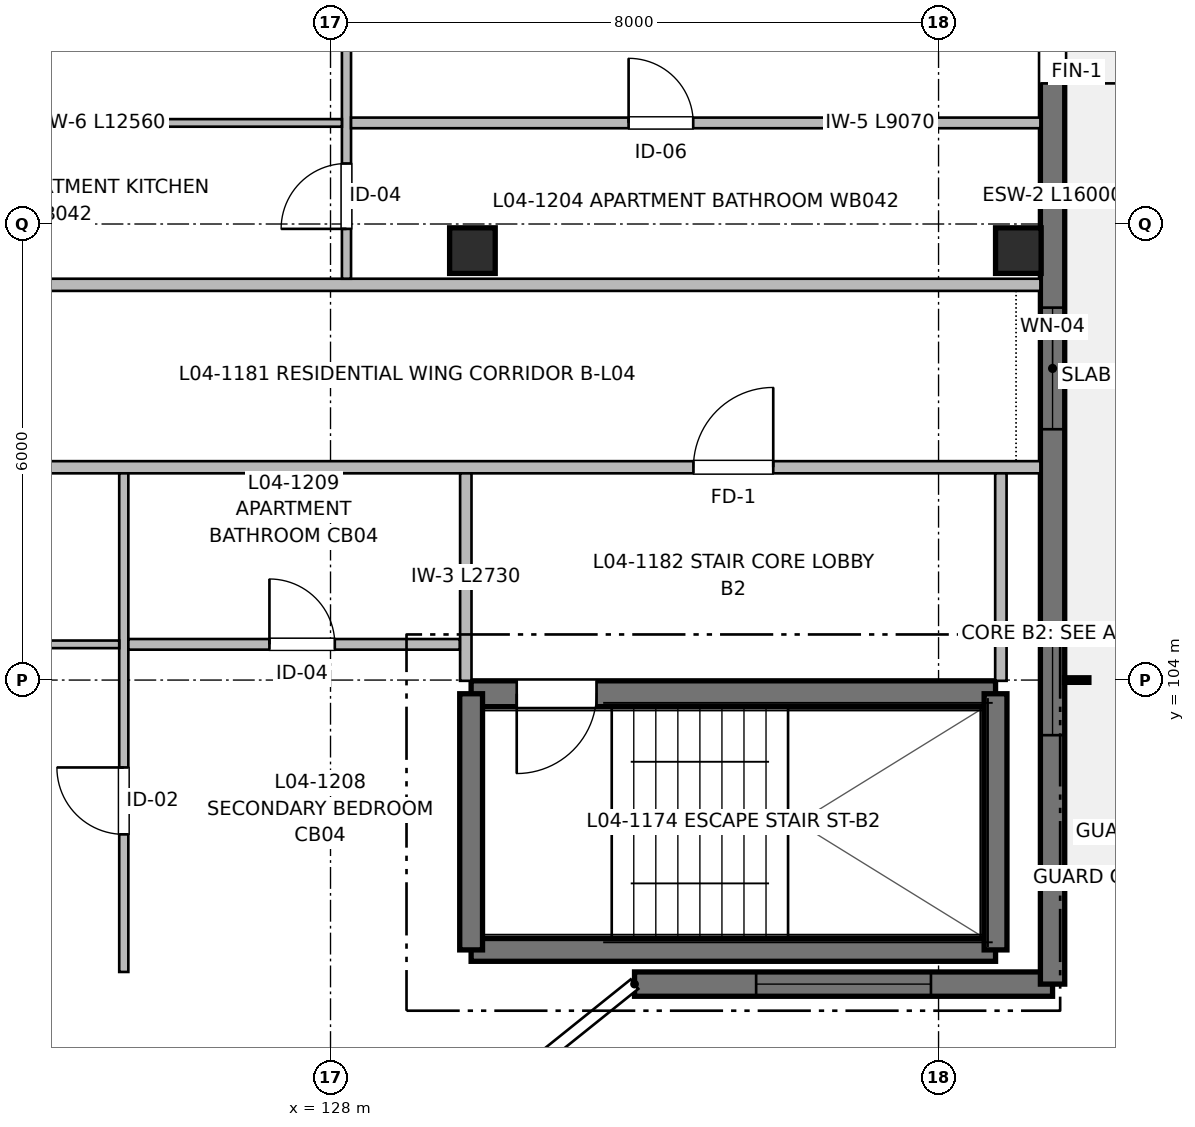
"""IFC4 building model, lengths in metres.
Left out: names, types, materials, properties, quantities, classifications, styles, units other than length and angle.
Written with IfcOpenShell. Run it as: python <this file> out.ifc"""

import sys

from ifc_helpers import new_model, si_unit, direction, frame, frame_2d, origin, origin_2d, place, context, subcontext, project, spatial, rectangle, extrude, element, fill, save


model = new_model("IFC4")
c1 = context("Model", 3, precision=1e-05, world=origin(), true_north=direction((0.0, 1.0)))
c2 = subcontext(c1, "Body", "Model", "MODEL_VIEW")
j1 = project(units=[si_unit("LENGTHUNIT", "METRE"), si_unit("PLANEANGLEUNIT", "RADIAN")], contexts=[c1])
p1 = place(None, origin())
s1 = spatial("IfcSite", under=j1, at=p1, CompositionType="ELEMENT")
p2 = place(p1, origin())
s2 = spatial("IfcBuilding", under=s1, at=p2, CompositionType="ELEMENT")
p3 = place(p2, frame((0.0, 0.0, 13.76)))
s3 = spatial("IfcBuildingStorey", under=s2, at=p3, CompositionType="ELEMENT", Elevation=13.76)
for number, where, z_axis, x_axis in (
    (1, (129.867, 109.65, 0.0), (0.0, 0.0, 1.0), (1.0, 0.0, 0.0)),
    (2, (137.05, 109.65, 0.0), (0.0, 0.0, 1.0), (1.0, 0.0, 0.0)),
):
    element("IfcColumn", number, at=place(p3, frame(where, z_axis=z_axis, x_axis=x_axis)), inside=s3, PredefinedType="COLUMN", context=c2, shape_type="SweptSolid", body=[
        extrude(rectangle(XDim=0.6, YDim=0.6, at=origin_2d()), origin(), (0.0, 0.0, 1.0), 3.2),
    ])
p4 = place(p3, frame((129.85, 100.45, 0.0), z_axis=(0.0, 0.0, 1.0), x_axis=(1.0, 0.0, 0.0)))
e3 = element("IfcWall", 3, at=p4, inside=s3, PredefinedType="SHEAR", context=c2, shape_type="SweptSolid", body=[
    extrude(rectangle(XDim=6.9, YDim=0.3, at=frame_2d((3.45, 0.0))), origin(), (0.0, 0.0, 1.0), 3.2),
])
p5 = place(p3, frame((136.75, 103.82, 0.0), z_axis=(0.0, 0.0, 1.0), x_axis=(-1.0, 0.0, 0.0)))
e4 = element("IfcWall", 4, at=p5, inside=s3, PredefinedType="SHEAR", context=c2, shape_type="SweptSolid", body=[
    extrude(rectangle(XDim=6.9, YDim=0.34, at=frame_2d((3.45, 0.0))), origin(), (0.0, 0.0, 1.0), 3.2),
])
p6 = place(p5, frame((5.25, 0.0, 0.0)))
e5 = element("IfcOpeningElement", 5, at=p6, cuts=e4, PredefinedType="OPENING", context=c2, shape_type="SweptSolid", body=[
    extrude(rectangle(XDim=1.05, YDim=2.15, at=frame_2d((0.525, 1.075))), frame((0.0, 0.18, 0.0), z_axis=(0.0, -1.0, 0.0), x_axis=(1.0, 0.0, 0.0)), (0.0, 0.0, 1.0), 0.36),
])
for number, where, z_axis, x_axis in (
    (6, (129.85, 103.82, 0.0), (0.0, 0.0, 1.0), (0.0, -1.0, 0.0)),
    (7, (136.75, 100.45, 0.0), (0.0, 0.0, 1.0), (0.0, 1.0, 0.0)),
):
    element("IfcWall", number, at=place(p3, frame(where, z_axis=z_axis, x_axis=x_axis)), inside=s3, PredefinedType="SHEAR", context=c2, shape_type="SweptSolid", body=[
        extrude(rectangle(XDim=3.37, YDim=0.3, at=frame_2d((1.685, 0.0))), origin(), (0.0, 0.0, 1.0), 3.2),
    ])
p7 = place(p3, frame((137.5, 100.0, 0.0), z_axis=(0.0, 0.0, 1.0), x_axis=(-1.0, 0.0, 0.0)))
e8 = element("IfcWall", 8, at=p7, inside=s3, PredefinedType="SHEAR", context=c2, shape_type="SweptSolid", body=[
    extrude(rectangle(XDim=5.5, YDim=0.32, at=frame_2d((2.75, 0.0))), origin(), (0.0, 0.0, 1.0), 2.98),
])
p8 = place(p7, frame((1.6, 0.0, 0.57)))
e9 = element("IfcOpeningElement", 9, at=p8, cuts=e8, PredefinedType="OPENING", context=c2, shape_type="SweptSolid", body=[
    extrude(rectangle(XDim=2.3, YDim=1.65, at=frame_2d((1.15, 0.825))), frame((0.0, 0.17, 0.0), z_axis=(0.0, -1.0, 0.0), x_axis=(1.0, 0.0, 0.0)), (0.0, 0.0, 1.0), 0.34),
])
p9 = place(p3, frame((137.5, 116.0, 0.0), z_axis=(0.0, 0.0, 1.0), x_axis=(0.0, -1.0, 0.0)))
e10 = element("IfcWall", 10, at=p9, inside=s3, PredefinedType="SHEAR", context=c2, shape_type="SweptSolid", body=[
    extrude(rectangle(XDim=16.0, YDim=0.32, at=frame_2d((8.0, 0.0))), origin(), (0.0, 0.0, 1.0), 2.98),
])
p10 = place(p9, frame((2.95, 0.0, 0.0)))
e11 = element("IfcOpeningElement", 11, at=p10, cuts=e10, PredefinedType="OPENING", context=c2, shape_type="SweptSolid", body=[
    extrude(rectangle(XDim=1.2, YDim=2.2, at=frame_2d((0.6, 1.1))), frame((0.0, 0.17, 0.0), z_axis=(0.0, -1.0, 0.0), x_axis=(1.0, 0.0, 0.0)), (0.0, 0.0, 1.0), 0.34),
])
p11 = place(p9, frame((7.1, 0.0, 0.77)))
e12 = element("IfcOpeningElement", 12, at=p11, cuts=e10, PredefinedType="OPENING", context=c2, shape_type="SweptSolid", body=[
    extrude(rectangle(XDim=1.6, YDim=1.45, at=frame_2d((0.8, 0.725))), frame((0.0, 0.17, 0.0), z_axis=(0.0, -1.0, 0.0), x_axis=(1.0, 0.0, 0.0)), (0.0, 0.0, 1.0), 0.34),
])
p12 = place(p9, frame((11.275, 0.0, 0.77)))
e13 = element("IfcOpeningElement", 13, at=p12, cuts=e10, PredefinedType="OPENING", context=c2, shape_type="SweptSolid", body=[
    extrude(rectangle(XDim=1.45, YDim=1.45, at=frame_2d((0.725, 0.725))), frame((0.0, 0.17, 0.0), z_axis=(0.0, -1.0, 0.0), x_axis=(1.0, 0.0, 0.0)), (0.0, 0.0, 1.0), 0.34),
])
p13 = place(p3, frame((113.2, 106.8, 0.0), z_axis=(0.0, 0.0, 1.0), x_axis=(1.0, 0.0, 0.0)))
e14 = element("IfcWall", 14, at=p13, inside=s3, PredefinedType="PARTITIONING", context=c2, shape_type="SweptSolid", body=[
    extrude(rectangle(XDim=24.14, YDim=0.16, at=frame_2d((12.07, 0.0))), origin(), (0.0, 0.0, 1.0), 2.935),
])
p14 = place(p13, frame((19.575, 0.0, 0.0)))
e15 = element("IfcOpeningElement", 15, at=p14, cuts=e14, PredefinedType="OPENING", context=c2, shape_type="SweptSolid", body=[
    extrude(rectangle(XDim=1.05, YDim=2.15, at=frame_2d((0.525, 1.075))), frame((0.0, 0.09, 0.0), z_axis=(0.0, -1.0, 0.0), x_axis=(1.0, 0.0, 0.0)), (0.0, 0.0, 1.0), 0.18),
])
p15 = place(p13, frame((8.995, 0.0, 0.0)))
e16 = element("IfcOpeningElement", 16, at=p15, cuts=e14, PredefinedType="OPENING", context=c2, shape_type="SweptSolid", body=[
    extrude(rectangle(XDim=0.98, YDim=2.15, at=frame_2d((0.49, 1.075))), frame((0.0, 0.09, 0.0), z_axis=(0.0, -1.0, 0.0), x_axis=(1.0, 0.0, 0.0)), (0.0, 0.0, 1.0), 0.18),
])
p16 = place(p3, frame((93.66, 109.2, 0.0), z_axis=(0.0, 0.0, 1.0), x_axis=(1.0, 0.0, 0.0)))
e17 = element("IfcWall", 17, at=p16, inside=s3, PredefinedType="PARTITIONING", context=c2, shape_type="SweptSolid", body=[
    extrude(rectangle(XDim=43.68, YDim=0.16, at=frame_2d((21.84, 0.0))), origin(), (0.0, 0.0, 1.0), 2.935),
])
p17 = place(p16, frame((5.815, 0.0, 0.0)))
e18 = element("IfcOpeningElement", 18, at=p17, cuts=e17, PredefinedType="OPENING", context=c2, shape_type="SweptSolid", body=[
    extrude(rectangle(XDim=0.98, YDim=2.15, at=frame_2d((0.49, 1.075))), frame((0.0, 0.09, 0.0), z_axis=(0.0, -1.0, 0.0), x_axis=(1.0, 0.0, 0.0)), (0.0, 0.0, 1.0), 0.18),
])
p18 = place(p16, frame((27.35, 0.0, 0.0)))
e19 = element("IfcOpeningElement", 19, at=p18, cuts=e17, PredefinedType="OPENING", context=c2, shape_type="SweptSolid", body=[
    extrude(rectangle(XDim=0.98, YDim=2.15, at=frame_2d((0.49, 1.075))), frame((0.0, 0.09, 0.0), z_axis=(0.0, -1.0, 0.0), x_axis=(1.0, 0.0, 0.0)), (0.0, 0.0, 1.0), 0.18),
])
for number, where, z_axis, x_axis in (
    (20, (129.78, 103.99, 0.0), (0.0, 0.0, 1.0), (0.0, 1.0, 0.0)),
    (21, (136.82, 103.99, 0.0), (0.0, 0.0, 1.0), (0.0, 1.0, 0.0)),
):
    element("IfcWall", number, at=place(p3, frame(where, z_axis=z_axis, x_axis=x_axis)), inside=s3, PredefinedType="PARTITIONING", context=c2, shape_type="SweptSolid", body=[
        extrude(rectangle(XDim=2.73, YDim=0.15, at=frame_2d((1.365, 0.0))), origin(), (0.0, 0.0, 1.0), 2.935),
    ])
p19 = place(p3, frame((128.21, 109.28, 0.0), z_axis=(0.0, 0.0, 1.0), x_axis=(0.0, 1.0, 0.0)))
e22 = element("IfcWall", 22, at=p19, inside=s3, PredefinedType="PARTITIONING", context=c2, shape_type="SweptSolid", body=[
    extrude(rectangle(XDim=6.59, YDim=0.12, at=frame_2d((3.295, 0.0))), origin(), (0.0, 0.0, 1.0), 2.935),
])
p20 = place(p19, frame((0.656, 0.0, 0.0)))
e23 = element("IfcOpeningElement", 23, at=p20, cuts=e22, PredefinedType="OPENING", context=c2, shape_type="SweptSolid", body=[
    extrude(rectangle(XDim=0.86, YDim=2.1, at=frame_2d((0.43, 1.05))), frame((0.0, 0.07, 0.0), z_axis=(0.0, -1.0, 0.0), x_axis=(1.0, 0.0, 0.0)), (0.0, 0.0, 1.0), 0.14),
])
p21 = place(p19, frame((4.093, 0.0, 0.0)))
e24 = element("IfcOpeningElement", 24, at=p21, cuts=e22, PredefinedType="OPENING", context=c2, shape_type="SweptSolid", body=[
    extrude(rectangle(XDim=0.9, YDim=2.1, at=frame_2d((0.45, 1.05))), frame((0.0, 0.07, 0.0), z_axis=(0.0, -1.0, 0.0), x_axis=(1.0, 0.0, 0.0)), (0.0, 0.0, 1.0), 0.14),
])
p22 = place(p3, frame((128.27, 111.33, 0.0), z_axis=(0.0, 0.0, 1.0), x_axis=(1.0, 0.0, 0.0)))
e25 = element("IfcWall", 25, at=p22, inside=s3, PredefinedType="PARTITIONING", context=c2, shape_type="SweptSolid", body=[
    extrude(rectangle(XDim=9.07, YDim=0.14, at=frame_2d((4.535, 0.0))), origin(), (0.0, 0.0, 1.0), 2.935),
])
p23 = place(p22, frame((3.652, 0.0, 0.0)))
e26 = element("IfcOpeningElement", 26, at=p23, cuts=e25, PredefinedType="OPENING", context=c2, shape_type="SweptSolid", body=[
    extrude(rectangle(XDim=0.85, YDim=2.05, at=frame_2d((0.425, 1.025))), frame((0.0, 0.08, 0.0), z_axis=(0.0, -1.0, 0.0), x_axis=(1.0, 0.0, 0.0)), (0.0, 0.0, 1.0), 0.16),
])
p24 = place(p3, frame((115.59, 111.33, 0.0), z_axis=(0.0, 0.0, 1.0), x_axis=(1.0, 0.0, 0.0)))
e27 = element("IfcWall", 27, at=p24, inside=s3, PredefinedType="PARTITIONING", context=c2, shape_type="SweptSolid", body=[
    extrude(rectangle(XDim=12.56, YDim=0.1, at=frame_2d((6.28, 0.0))), origin(), (0.0, 0.0, 1.0), 2.935),
])
p25 = place(p24, frame((5.048, 0.0, 0.0)))
e28 = element("IfcOpeningElement", 28, at=p25, cuts=e27, PredefinedType="OPENING", context=c2, shape_type="SweptSolid", body=[
    extrude(rectangle(XDim=0.92, YDim=2.1, at=frame_2d((0.46, 1.05))), frame((0.0, 0.06, 0.0), z_axis=(0.0, -1.0, 0.0), x_axis=(1.0, 0.0, 0.0)), (0.0, 0.0, 1.0), 0.12),
])
p26 = place(p3, frame((125.28, 100.16, 0.0), z_axis=(0.0, 0.0, 1.0), x_axis=(0.0, 1.0, 0.0)))
e29 = element("IfcWall", 29, at=p26, inside=s3, PredefinedType="PARTITIONING", context=c2, shape_type="SweptSolid", body=[
    extrude(rectangle(XDim=6.56, YDim=0.12, at=frame_2d((3.28, 0.0))), origin(), (0.0, 0.0, 1.0), 2.935),
])
p27 = place(p26, frame((1.81, 0.0, 0.0)))
e30 = element("IfcOpeningElement", 30, at=p27, cuts=e29, PredefinedType="OPENING", context=c2, shape_type="SweptSolid", body=[
    extrude(rectangle(XDim=0.88, YDim=2.1, at=frame_2d((0.44, 1.05))), frame((0.0, 0.07, 0.0), z_axis=(0.0, -1.0, 0.0), x_axis=(1.0, 0.0, 0.0)), (0.0, 0.0, 1.0), 0.14),
])
p28 = place(p3, frame((125.34, 104.47, 0.0), z_axis=(0.0, 0.0, 1.0), x_axis=(1.0, 0.0, 0.0)))
e31 = element("IfcWall", 31, at=p28, inside=s3, PredefinedType="PARTITIONING", context=c2, shape_type="SweptSolid", body=[
    extrude(rectangle(XDim=4.36, YDim=0.14, at=frame_2d((2.18, 0.0))), origin(), (0.0, 0.0, 1.0), 2.935),
])
p29 = place(p28, frame((1.856, 0.0, 0.0)))
e32 = element("IfcOpeningElement", 32, at=p29, cuts=e31, PredefinedType="OPENING", context=c2, shape_type="SweptSolid", body=[
    extrude(rectangle(XDim=0.86, YDim=2.1, at=frame_2d((0.43, 1.05))), frame((0.0, 0.08, 0.0), z_axis=(0.0, -1.0, 0.0), x_axis=(1.0, 0.0, 0.0)), (0.0, 0.0, 1.0), 0.16),
])
p30 = place(p3, frame((120.09, 104.47, 0.0), z_axis=(0.0, 0.0, 1.0), x_axis=(1.0, 0.0, 0.0)))
e33 = element("IfcWall", 33, at=p30, inside=s3, PredefinedType="PARTITIONING", context=c2, shape_type="SweptSolid", body=[
    extrude(rectangle(XDim=5.13, YDim=0.1, at=frame_2d((2.565, 0.0))), origin(), (0.0, 0.0, 1.0), 2.935),
])
p31 = place(p30, frame((2.18, 0.0, 0.0)))
e34 = element("IfcOpeningElement", 34, at=p31, cuts=e33, PredefinedType="OPENING", context=c2, shape_type="SweptSolid", body=[
    extrude(rectangle(XDim=0.92, YDim=2.1, at=frame_2d((0.46, 1.05))), frame((0.0, 0.06, 0.0), z_axis=(0.0, -1.0, 0.0), x_axis=(1.0, 0.0, 0.0)), (0.0, 0.0, 1.0), 0.12),
])
p32 = place(p6, origin())
e35 = element("IfcDoor", 35, at=p32, inside=s3, OperationType="SINGLE_SWING_RIGHT", PredefinedType="DOOR", context=c2, shape_type="SweptSolid", body=[
    extrude(rectangle(XDim=1.05, YDim=2.15, at=frame_2d((0.525, 1.075))), frame((0.0, 0.025, 0.0), z_axis=(0.0, -1.0, 0.0), x_axis=(1.0, 0.0, 0.0)), (0.0, 0.0, 1.0), 0.05),
])
fill(e5, e35)
p33 = place(p8, origin())
e36 = element("IfcWindow", 36, at=p33, inside=s3, PartitioningType="SINGLE_PANEL", PredefinedType="WINDOW", context=c2, shape_type="SweptSolid", body=[
    extrude(rectangle(XDim=2.3, YDim=1.65, at=frame_2d((1.15, 0.825))), frame((0.0, 0.03, 0.0), z_axis=(0.0, -1.0, 0.0), x_axis=(1.0, 0.0, 0.0)), (0.0, 0.0, 1.0), 0.06),
])
fill(e9, e36)
p34 = place(p10, origin())
e37 = element("IfcDoor", 37, at=p34, inside=s3, OperationType="SINGLE_SWING_RIGHT", PredefinedType="DOOR", context=c2, shape_type="SweptSolid", body=[
    extrude(rectangle(XDim=1.2, YDim=2.2, at=frame_2d((0.6, 1.1))), frame((0.0, 0.025, 0.0), z_axis=(0.0, -1.0, 0.0), x_axis=(1.0, 0.0, 0.0)), (0.0, 0.0, 1.0), 0.05),
])
fill(e11, e37)
p35 = place(p11, origin())
e38 = element("IfcWindow", 38, at=p35, inside=s3, PartitioningType="SINGLE_PANEL", PredefinedType="WINDOW", context=c2, shape_type="SweptSolid", body=[
    extrude(rectangle(XDim=1.6, YDim=1.45, at=frame_2d((0.8, 0.725))), frame((0.0, 0.03, 0.0), z_axis=(0.0, -1.0, 0.0), x_axis=(1.0, 0.0, 0.0)), (0.0, 0.0, 1.0), 0.06),
])
fill(e12, e38)
p36 = place(p12, origin())
e39 = element("IfcWindow", 39, at=p36, inside=s3, PartitioningType="SINGLE_PANEL", PredefinedType="WINDOW", context=c2, shape_type="SweptSolid", body=[
    extrude(rectangle(XDim=1.45, YDim=1.45, at=frame_2d((0.725, 0.725))), frame((0.0, 0.03, 0.0), z_axis=(0.0, -1.0, 0.0), x_axis=(1.0, 0.0, 0.0)), (0.0, 0.0, 1.0), 0.06),
])
fill(e13, e39)
p37 = place(p14, origin())
e40 = element("IfcDoor", 40, at=p37, inside=s3, OperationType="SINGLE_SWING_RIGHT", PredefinedType="DOOR", context=c2, shape_type="SweptSolid", body=[
    extrude(rectangle(XDim=1.05, YDim=2.15, at=frame_2d((0.525, 1.075))), frame((0.0, 0.025, 0.0), z_axis=(0.0, -1.0, 0.0), x_axis=(1.0, 0.0, 0.0)), (0.0, 0.0, 1.0), 0.05),
])
fill(e15, e40)
p38 = place(p20, origin())
e41 = element("IfcDoor", 41, at=p38, inside=s3, OperationType="SINGLE_SWING_LEFT", PredefinedType="DOOR", context=c2, shape_type="SweptSolid", body=[
    extrude(rectangle(XDim=0.86, YDim=2.1, at=frame_2d((0.43, 1.05))), frame((0.0, 0.025, 0.0), z_axis=(0.0, -1.0, 0.0), x_axis=(1.0, 0.0, 0.0)), (0.0, 0.0, 1.0), 0.05),
])
fill(e23, e41)
p39 = place(p23, origin())
e42 = element("IfcDoor", 42, at=p39, inside=s3, OperationType="SINGLE_SWING_LEFT", PredefinedType="DOOR", context=c2, shape_type="SweptSolid", body=[
    extrude(rectangle(XDim=0.85, YDim=2.05, at=frame_2d((0.425, 1.025))), frame((0.0, 0.025, 0.0), z_axis=(0.0, -1.0, 0.0), x_axis=(1.0, 0.0, 0.0)), (0.0, 0.0, 1.0), 0.05),
])
fill(e26, e42)
p40 = place(p27, origin())
e43 = element("IfcDoor", 43, at=p40, inside=s3, OperationType="SINGLE_SWING_RIGHT", PredefinedType="DOOR", context=c2, shape_type="SweptSolid", body=[
    extrude(rectangle(XDim=0.88, YDim=2.1, at=frame_2d((0.44, 1.05))), frame((0.0, 0.025, 0.0), z_axis=(0.0, -1.0, 0.0), x_axis=(1.0, 0.0, 0.0)), (0.0, 0.0, 1.0), 0.05),
])
fill(e30, e43)
p41 = place(p29, origin())
e44 = element("IfcDoor", 44, at=p41, inside=s3, OperationType="SINGLE_SWING_LEFT", PredefinedType="DOOR", context=c2, shape_type="SweptSolid", body=[
    extrude(rectangle(XDim=0.86, YDim=2.1, at=frame_2d((0.43, 1.05))), frame((0.0, 0.025, 0.0), z_axis=(0.0, -1.0, 0.0), x_axis=(1.0, 0.0, 0.0)), (0.0, 0.0, 1.0), 0.05),
])
fill(e32, e44)
save(model, sys.argv[1])
